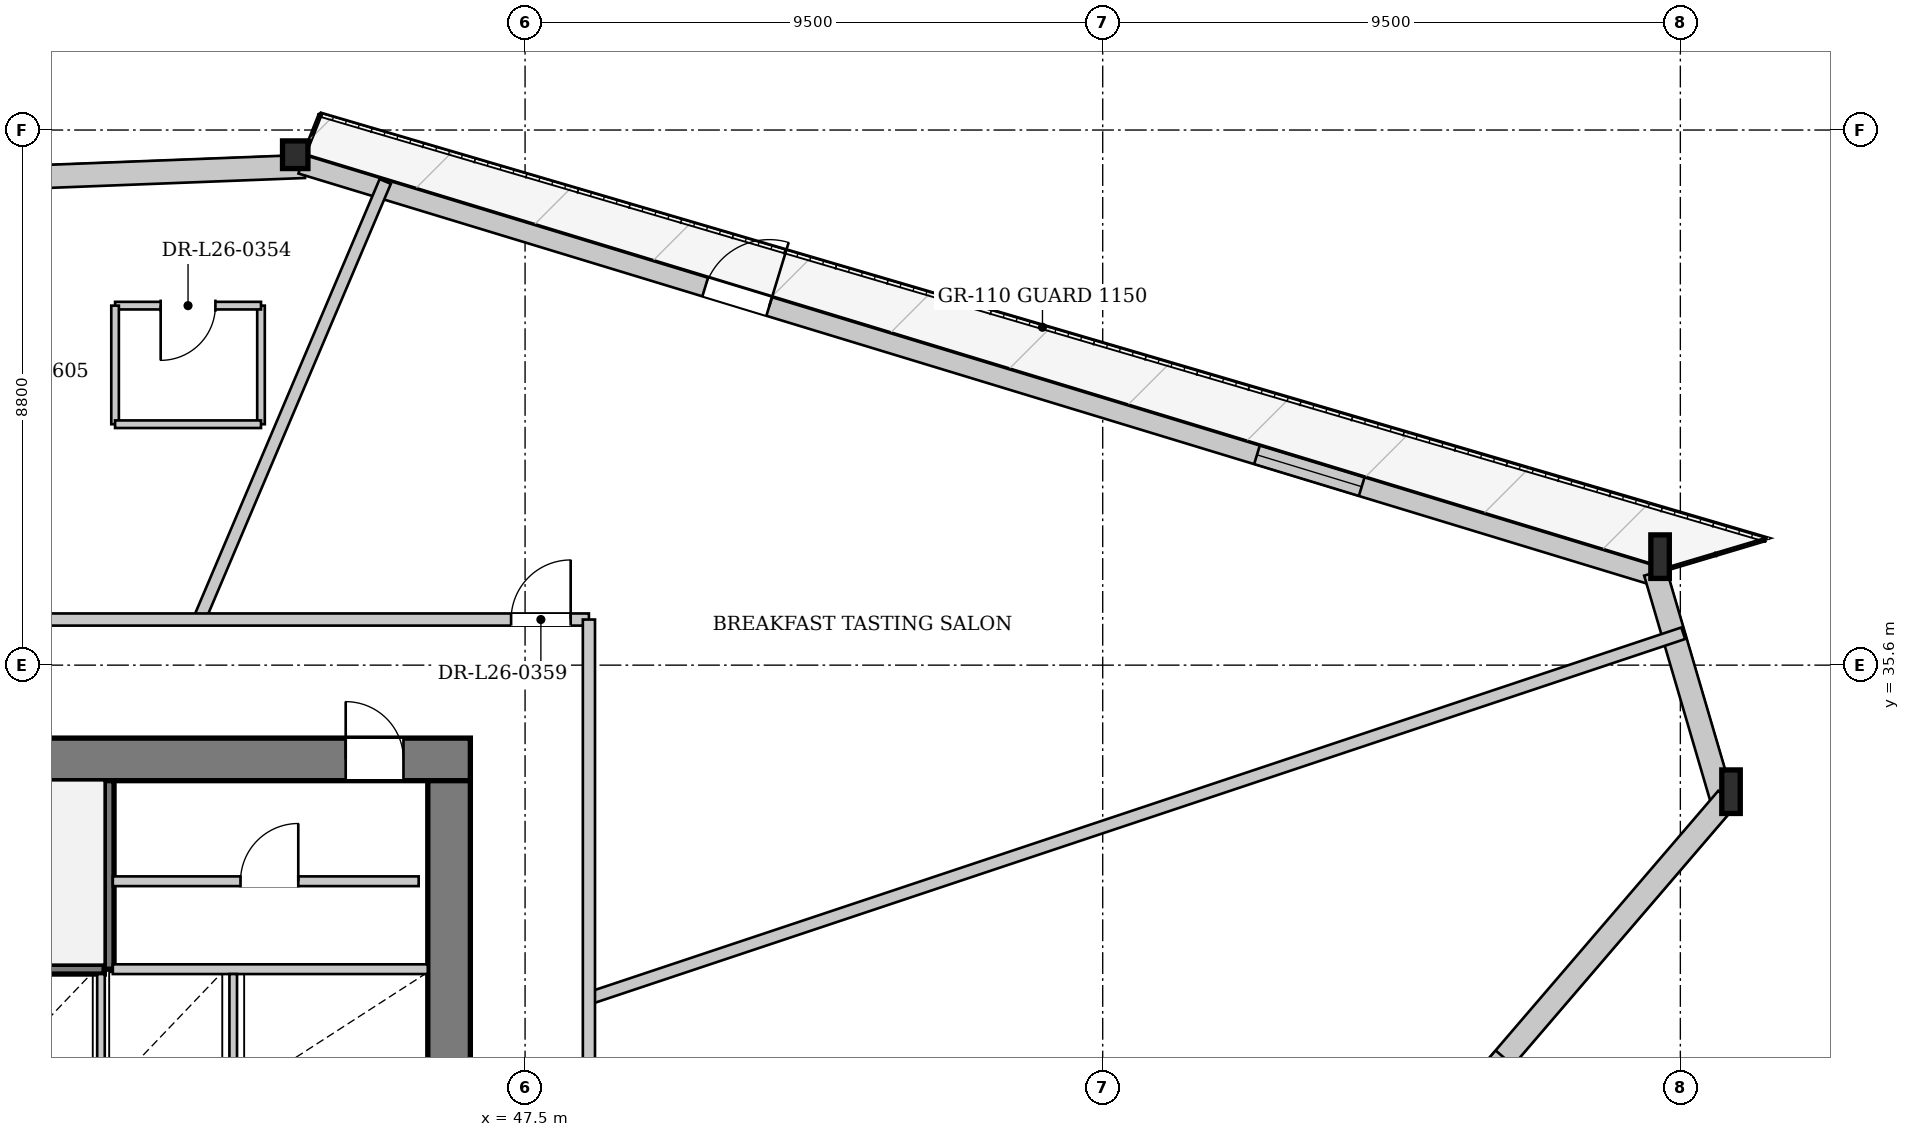
"""IFC4 building model, lengths in metres.
Left out: names, types, materials, properties, quantities, classifications, styles, units other than length and angle.
Written with IfcOpenShell. Run it as: python <this file> out.ifc"""

import sys

from ifc_helpers import new_model, si_unit, direction, frame, frame_2d, origin, origin_2d, place, context, subcontext, project, spatial, rectangle, i_section, extrude, source, transform, mapped, element, fill, save


model = new_model("IFC4")
c1 = context("Model", 3, precision=1e-05, world=origin(), true_north=direction((0.0, 1.0)))
c2 = subcontext(c1, "Body", "Model", "MODEL_VIEW")
j1 = project(units=[si_unit("LENGTHUNIT", "METRE"), si_unit("PLANEANGLEUNIT", "RADIAN")], contexts=[c1])
p1 = place(None, origin())
s1 = spatial("IfcSite", under=j1, at=p1, CompositionType="ELEMENT")
p2 = place(p1, origin())
s2 = spatial("IfcBuilding", under=s1, at=p2, CompositionType="ELEMENT")
p3 = place(p2, frame((0.0, 0.0, 102.15)))
s3 = spatial("IfcBuildingStorey", under=s2, at=p3, CompositionType="ELEMENT", Elevation=102.15)
m1 = source(origin(), c2, "Body", "SweptSolid", [
    extrude(i_section(OverallWidth=0.304, OverallDepth=0.716, WebThickness=0.021, FlangeThickness=0.04, at=origin_2d()), origin(), (0.0, 0.0, 1.0), 3.42),
])
p4 = place(p3, frame((67.412, 33.286, 0.0), z_axis=(-0.045751929855, 0.136185151582, 0.989626376671), x_axis=(-0.947935431433, -0.318462584669, 0.0)))
e1 = element("IfcColumn", 1, at=p4, inside=s3, PredefinedType="COLUMN", context=c2, shape_type="MappedRepresentation", body=[
    mapped(m1, transform((0.0, 0.0, 0.0), x_axis=(1.0, 0.0, 0.0), y_axis=(0.0, 1.0, 0.0), z_axis=(0.0, 0.0, 1.0), scale=1.0)),
])
m2 = source(origin(), c2, "Body", "SweptSolid", [
    extrude(i_section(OverallWidth=0.304, OverallDepth=0.716, WebThickness=0.021, FlangeThickness=0.04, at=origin_2d()), origin(), (0.0, 0.0, 1.0), 3.416),
])
p5 = place(p3, frame((66.27, 37.179, 0.0), z_axis=(-0.060390314415, 0.120280354036, 0.990901431202), x_axis=(-0.893682547282, -0.448699793496, 0.0)))
e2 = element("IfcColumn", 2, at=p5, inside=s3, PredefinedType="COLUMN", context=c2, shape_type="MappedRepresentation", body=[
    mapped(m2, transform((0.0, 0.0, 0.0), x_axis=(1.0, 0.0, 0.0), y_axis=(0.0, 1.0, 0.0), z_axis=(0.0, 0.0, 1.0), scale=1.0)),
])
m3 = source(origin(), c2, "Body", "SweptSolid", [
    extrude(i_section(OverallWidth=0.418, OverallDepth=0.455, WebThickness=0.038, FlangeThickness=0.059, at=origin_2d()), origin(), (0.0, 0.0, 1.0), 3.398),
])
p6 = place(p3, frame((43.866, 43.991, 0.0), z_axis=(-0.08615507832, 0.001652682904, 0.996280367727), x_axis=(-0.019179123824, -0.999816063688, 0.0)))
e3 = element("IfcColumn", 3, at=p6, inside=s3, PredefinedType="COLUMN", context=c2, shape_type="MappedRepresentation", body=[
    mapped(m3, transform((0.0, 0.0, 0.0), x_axis=(1.0, 0.0, 0.0), y_axis=(0.0, 1.0, 0.0), z_axis=(0.0, 0.0, 1.0), scale=1.0)),
])
p7 = place(p3, frame((20.475, 42.894, 0.0), z_axis=(0.0, 0.0, 1.0), x_axis=(0.999249191087, 0.038743439593, 0.0)))
e4 = element("IfcWall", 4, at=p7, inside=s3, PredefinedType="SOLIDWALL", context=c2, shape_type="SweptSolid", body=[
    extrude(rectangle(XDim=23.416, YDim=0.38, at=frame_2d((11.708, 0.0))), origin(), (0.0, 0.0, 1.0), 2.692),
])
p8 = place(p7, frame((5.457, 0.0, 0.322)))
e5 = element("IfcOpeningElement", 5, at=p8, cuts=e4, PredefinedType="OPENING", context=c2, shape_type="SweptSolid", body=[
    extrude(rectangle(XDim=2.2, YDim=2.25, at=frame_2d((1.1, 1.125))), frame((0.0, 0.2, 0.0), z_axis=(0.0, -1.0, 0.0), x_axis=(1.0, 0.0, 0.0)), (0.0, 0.0, 1.0), 0.4),
])
p9 = place(p7, frame((15.76, 0.0, 0.322)))
e6 = element("IfcOpeningElement", 6, at=p9, cuts=e4, PredefinedType="OPENING", context=c2, shape_type="SweptSolid", body=[
    extrude(rectangle(XDim=2.2, YDim=2.25, at=frame_2d((1.1, 1.125))), frame((0.0, 0.2, 0.0), z_axis=(0.0, -1.0, 0.0), x_axis=(1.0, 0.0, 0.0)), (0.0, 0.0, 1.0), 0.4),
])
p10 = place(p3, frame((43.82, 43.838, 0.0), z_axis=(0.0, 0.0, 1.0), x_axis=(0.956744940145, -0.290928031491, 0.0)))
e7 = element("IfcWall", 7, at=p10, inside=s3, PredefinedType="SOLIDWALL", context=c2, shape_type="SweptSolid", body=[
    extrude(rectangle(XDim=23.417, YDim=0.32, at=frame_2d((11.708, 0.0))), origin(), (0.0, 0.0, 1.0), 2.692),
])
p11 = place(p10, frame((6.943, 0.0, 0.0)))
e8 = element("IfcOpeningElement", 8, at=p11, cuts=e7, PredefinedType="OPENING", context=c2, shape_type="SweptSolid", body=[
    extrude(rectangle(XDim=1.1, YDim=2.3, at=frame_2d((0.55, 1.15))), frame((0.0, 0.17, 0.0), z_axis=(0.0, -1.0, 0.0), x_axis=(1.0, 0.0, 0.0)), (0.0, 0.0, 1.0), 0.34),
])
p12 = place(p10, frame((16.428, 0.0, 0.372)))
e9 = element("IfcOpeningElement", 9, at=p12, cuts=e7, PredefinedType="OPENING", context=c2, shape_type="SweptSolid", body=[
    extrude(rectangle(XDim=1.8, YDim=2.2, at=frame_2d((0.9, 1.1))), frame((0.0, 0.17, 0.0), z_axis=(0.0, -1.0, 0.0), x_axis=(1.0, 0.0, 0.0)), (0.0, 0.0, 1.0), 0.34),
])
p13 = place(p3, frame((66.087, 37.125, 0.0), z_axis=(0.0, 0.0, 1.0), x_axis=(0.281534153889, -0.959551207698, 0.0)))
e10 = element("IfcWall", 10, at=p13, inside=s3, PredefinedType="SOLIDWALL", context=c2, shape_type="SweptSolid", body=[
    extrude(rectangle(XDim=4.057, YDim=0.38, at=frame_2d((2.028, 0.0))), origin(), (0.0, 0.0, 1.0), 2.692),
])
p14 = place(p3, frame((67.268, 33.409, 0.0), z_axis=(0.0, 0.0, 1.0), x_axis=(-0.651112760172, -0.75898101, 0.0)))
e11 = element("IfcWall", 11, at=p14, inside=s3, PredefinedType="SOLIDWALL", context=c2, shape_type="SweptSolid", body=[
    extrude(rectangle(XDim=24.018, YDim=0.38, at=frame_2d((12.009, 0.0))), origin(), (0.0, 0.0, 1.0), 2.692),
])
p15 = place(p14, frame((5.625, 0.0, 0.322)))
e12 = element("IfcOpeningElement", 12, at=p15, cuts=e11, PredefinedType="OPENING", context=c2, shape_type="SweptSolid", body=[
    extrude(rectangle(XDim=2.2, YDim=2.25, at=frame_2d((1.1, 1.125))), frame((0.0, 0.2, 0.0), z_axis=(0.0, -1.0, 0.0), x_axis=(1.0, 0.0, 0.0)), (0.0, 0.0, 1.0), 0.4),
])
p16 = place(p14, frame((16.193, 0.0, 0.322)))
e13 = element("IfcOpeningElement", 13, at=p16, cuts=e11, PredefinedType="OPENING", context=c2, shape_type="SweptSolid", body=[
    extrude(rectangle(XDim=2.2, YDim=2.25, at=frame_2d((1.1, 1.125))), frame((0.0, 0.2, 0.0), z_axis=(0.0, -1.0, 0.0), x_axis=(1.0, 0.0, 0.0)), (0.0, 0.0, 1.0), 0.4),
])
p17 = place(p3, frame((29.4, 34.05, 0.0), z_axis=(0.0, 0.0, 1.0), x_axis=(1.0, 0.0, 0.0)))
e14 = element("IfcWall", 14, at=p17, inside=s3, PredefinedType="SHEAR", context=c2, shape_type="SweptSolid", body=[
    extrude(rectangle(XDim=17.2, YDim=0.7, at=frame_2d((8.6, 0.0))), origin(), (0.0, 0.0, 1.0), 3.3),
])
p18 = place(p17, frame((1.7, 0.0, 0.0)))
e15 = element("IfcOpeningElement", 15, at=p18, cuts=e14, PredefinedType="OPENING", context=c2, shape_type="SweptSolid", body=[
    extrude(rectangle(XDim=0.95, YDim=2.1, at=frame_2d((0.475, 1.05))), frame((0.0, 0.36, 0.0), z_axis=(0.0, -1.0, 0.0), x_axis=(1.0, 0.0, 0.0)), (0.0, 0.0, 1.0), 0.72),
])
p19 = place(p17, frame((4.08, 0.0, 0.0)))
e16 = element("IfcOpeningElement", 16, at=p19, cuts=e14, PredefinedType="OPENING", context=c2, shape_type="SweptSolid", body=[
    extrude(rectangle(XDim=1.32, YDim=2.2, at=frame_2d((0.66, 1.1))), frame((0.0, 0.36, 0.0), z_axis=(0.0, -1.0, 0.0), x_axis=(1.0, 0.0, 0.0)), (0.0, 0.0, 1.0), 0.72),
])
p20 = place(p17, frame((15.15, 0.0, 0.0)))
e17 = element("IfcOpeningElement", 17, at=p20, cuts=e14, PredefinedType="OPENING", context=c2, shape_type="SweptSolid", body=[
    extrude(rectangle(XDim=0.95, YDim=2.1, at=frame_2d((0.475, 1.05))), frame((0.0, 0.36, 0.0), z_axis=(0.0, -1.0, 0.0), x_axis=(1.0, 0.0, 0.0)), (0.0, 0.0, 1.0), 0.72),
])
p21 = place(p3, frame((46.25, 33.7, 0.0), z_axis=(0.0, 0.0, 1.0), x_axis=(0.0, -1.0, 0.0)))
e18 = element("IfcWall", 18, at=p21, inside=s3, PredefinedType="SHEAR", context=c2, shape_type="SweptSolid", body=[
    extrude(rectangle(XDim=14.2, YDim=0.7, at=frame_2d((7.1, 0.0))), origin(), (0.0, 0.0, 1.0), 3.3),
])
p22 = place(p21, frame((5.18, 0.0, 0.0)))
e19 = element("IfcOpeningElement", 19, at=p22, cuts=e18, PredefinedType="OPENING", context=c2, shape_type="SweptSolid", body=[
    extrude(rectangle(XDim=1.6, YDim=2.2, at=frame_2d((0.8, 1.1))), frame((0.0, 0.36, 0.0), z_axis=(0.0, -1.0, 0.0), x_axis=(1.0, 0.0, 0.0)), (0.0, 0.0, 1.0), 0.72),
])
p23 = place(p3, frame((33.28, 30.6, 0.0), z_axis=(0.0, 0.0, 1.0), x_axis=(1.0, 0.0, 0.0)))
e20 = element("IfcWall", 20, at=p23, inside=s3, PredefinedType="PARTITIONING", context=c2, shape_type="SweptSolid", body=[
    extrude(rectangle(XDim=7.3, YDim=0.16, at=frame_2d((3.65, 0.0))), origin(), (0.0, 0.0, 1.0), 3.3),
])
p24 = place(p3, frame((40.66, 30.6, 0.0), z_axis=(0.0, 0.0, 1.0), x_axis=(0.0, 1.0, 0.0)))
e21 = element("IfcWall", 21, at=p24, inside=s3, PredefinedType="PARTITIONING", context=c2, shape_type="SweptSolid", body=[
    extrude(rectangle(XDim=3.1, YDim=0.16, at=frame_2d((1.55, 0.0))), origin(), (0.0, 0.0, 1.0), 3.3),
])
p25 = place(p3, frame((40.72, 30.6, 0.0), z_axis=(0.0, 0.0, 1.0), x_axis=(1.0, 0.0, 0.0)))
e22 = element("IfcWall", 22, at=p25, inside=s3, PredefinedType="PARTITIONING", context=c2, shape_type="SweptSolid", body=[
    extrude(rectangle(XDim=5.18, YDim=0.16, at=frame_2d((2.59, 0.0))), origin(), (0.0, 0.0, 1.0), 3.3),
])
for number, where, z_axis, x_axis in (
    (23, (40.525, 28.6, 0.0), (0.0, 0.0, 1.0), (0.0, 1.0, 0.0)),
    (24, (42.7, 28.6, 0.0), (0.0, 0.0, 1.0), (0.0, 1.0, 0.0)),
):
    element("IfcWall", number, at=place(p3, frame(where, z_axis=z_axis, x_axis=x_axis)), inside=s3, PredefinedType="PARTITIONING", context=c2, shape_type="SweptSolid", body=[
        extrude(rectangle(XDim=1.92, YDim=0.125, at=frame_2d((0.96, 0.0))), origin(), (0.0, 0.0, 1.0), 3.3),
    ])
p26 = place(p3, frame((40.72, 32.046, 0.0), z_axis=(0.0, 0.0, 1.0), x_axis=(1.0, 0.0, 0.0)))
e25 = element("IfcWall", 25, at=p26, inside=s3, PredefinedType="PARTITIONING", context=c2, shape_type="SweptSolid", body=[
    extrude(rectangle(XDim=5.03, YDim=0.16, at=frame_2d((2.515, 0.0))), origin(), (0.0, 0.0, 1.0), 3.3),
])
p27 = place(p26, frame((2.1, 0.0, 0.0)))
e26 = element("IfcOpeningElement", 26, at=p27, cuts=e25, PredefinedType="OPENING", context=c2, shape_type="SweptSolid", body=[
    extrude(rectangle(XDim=0.95, YDim=2.1, at=frame_2d((0.475, 1.05))), frame((0.0, 0.09, 0.0), z_axis=(0.0, -1.0, 0.0), x_axis=(1.0, 0.0, 0.0)), (0.0, 0.0, 1.0), 0.18),
])
p28 = place(p3, frame((48.55, 30.12, 0.0), z_axis=(0.0, 0.0, 1.0), x_axis=(0.948597047754, 0.31648639938, 0.0)))
e27 = element("IfcWall", 27, at=p28, inside=s3, PredefinedType="PARTITIONING", context=c2, shape_type="SweptSolid", body=[
    extrude(rectangle(XDim=18.973, YDim=0.2, at=frame_2d((9.486, 0.0))), origin(), (0.0, 0.0, 1.0), 3.3),
])
p29 = place(p3, frame((42.141, 36.35, 0.0), z_axis=(0.0, 0.0, 1.0), x_axis=(0.390916709441, 0.920426056932, 0.0)))
e28 = element("IfcWall", 28, at=p29, inside=s3, PredefinedType="PARTITIONING", context=c2, shape_type="SweptSolid", body=[
    extrude(rectangle(XDim=7.827, YDim=0.2, at=frame_2d((3.913, 0.0))), origin(), (0.0, 0.0, 1.0), 3.3),
])
p30 = place(p3, frame((43.157, 39.562, 0.0), z_axis=(0.0, 0.0, 1.0), x_axis=(0.0, 1.0, 0.0)))
e29 = element("IfcWall", 29, at=p30, inside=s3, PredefinedType="PARTITIONING", context=c2, shape_type="SweptSolid", body=[
    extrude(rectangle(XDim=1.95, YDim=0.125, at=frame_2d((0.975, 0.0))), origin(), (0.0, 0.0, 1.0), 3.3),
])
p31 = place(p3, frame((43.157, 41.512, 0.0), z_axis=(0.0, 0.0, 1.0), x_axis=(-1.0, 0.0, 0.0)))
e30 = element("IfcWall", 30, at=p31, inside=s3, PredefinedType="PARTITIONING", context=c2, shape_type="SweptSolid", body=[
    extrude(rectangle(XDim=2.4, YDim=0.125, at=frame_2d((1.2, 0.0))), origin(), (0.0, 0.0, 1.0), 3.3),
])
p32 = place(p31, frame((0.75, 0.0, 0.0)))
e31 = element("IfcOpeningElement", 31, at=p32, cuts=e30, PredefinedType="OPENING", context=c2, shape_type="SweptSolid", body=[
    extrude(rectangle(XDim=0.9, YDim=2.1, at=frame_2d((0.45, 1.05))), frame((0.0, 0.073, 0.0), z_axis=(0.0, -1.0, 0.0), x_axis=(1.0, 0.0, 0.0)), (0.0, 0.0, 1.0), 0.145),
])
p33 = place(p3, frame((40.757, 41.512, 0.0), z_axis=(0.0, 0.0, 1.0), x_axis=(0.0, -1.0, 0.0)))
e32 = element("IfcWall", 32, at=p33, inside=s3, PredefinedType="PARTITIONING", context=c2, shape_type="SweptSolid", body=[
    extrude(rectangle(XDim=1.95, YDim=0.125, at=frame_2d((0.975, 0.0))), origin(), (0.0, 0.0, 1.0), 3.3),
])
p34 = place(p3, frame((40.757, 39.562, 0.0), z_axis=(0.0, 0.0, 1.0), x_axis=(1.0, 0.0, 0.0)))
e33 = element("IfcWall", 33, at=p34, inside=s3, PredefinedType="PARTITIONING", context=c2, shape_type="SweptSolid", body=[
    extrude(rectangle(XDim=2.4, YDim=0.125, at=frame_2d((1.2, 0.0))), origin(), (0.0, 0.0, 1.0), 3.045),
])
p35 = place(p3, frame((27.45, 36.35, 0.0), z_axis=(0.0, 0.0, 1.0), x_axis=(1.0, 0.0, 0.0)))
e34 = element("IfcWall", 34, at=p35, inside=s3, PredefinedType="PARTITIONING", context=c2, shape_type="SweptSolid", body=[
    extrude(rectangle(XDim=21.1, YDim=0.2, at=frame_2d((10.55, 0.0))), origin(), (0.0, 0.0, 1.0), 3.3),
])
p36 = place(p35, frame((19.82, 0.0, 0.0)))
e35 = element("IfcOpeningElement", 35, at=p36, cuts=e34, PredefinedType="OPENING", context=c2, shape_type="SweptSolid", body=[
    extrude(rectangle(XDim=0.98, YDim=2.15, at=frame_2d((0.49, 1.075))), frame((0.0, 0.11, 0.0), z_axis=(0.0, -1.0, 0.0), x_axis=(1.0, 0.0, 0.0)), (0.0, 0.0, 1.0), 0.22),
])
p37 = place(p35, frame((8.513, 0.0, 0.0)))
e36 = element("IfcOpeningElement", 36, at=p37, cuts=e34, PredefinedType="OPENING", context=c2, shape_type="SweptSolid", body=[
    extrude(rectangle(XDim=0.98, YDim=2.15, at=frame_2d((0.49, 1.075))), frame((0.0, 0.11, 0.0), z_axis=(0.0, -1.0, 0.0), x_axis=(1.0, 0.0, 0.0)), (0.0, 0.0, 1.0), 0.22),
])
p38 = place(p3, frame((48.55, 16.85, 0.0), z_axis=(0.0, 0.0, 1.0), x_axis=(0.0, 1.0, 0.0)))
e37 = element("IfcWall", 37, at=p38, inside=s3, PredefinedType="PARTITIONING", context=c2, shape_type="SweptSolid", body=[
    extrude(rectangle(XDim=19.5, YDim=0.2, at=frame_2d((9.75, 0.0))), origin(), (0.0, 0.0, 1.0), 3.3),
])
p39 = place(p38, frame((7.951, 0.0, 0.0)))
e38 = element("IfcOpeningElement", 38, at=p39, cuts=e37, PredefinedType="OPENING", context=c2, shape_type="SweptSolid", body=[
    extrude(rectangle(XDim=0.98, YDim=2.15, at=frame_2d((0.49, 1.075))), frame((0.0, 0.11, 0.0), z_axis=(0.0, -1.0, 0.0), x_axis=(1.0, 0.0, 0.0)), (0.0, 0.0, 1.0), 0.22),
])
m4 = source(origin(), c2, "Body", "SweptSolid", [
    extrude(rectangle(XDim=1.1, YDim=2.3, at=frame_2d((0.55, 1.15))), frame((0.0, 0.025, 0.0), z_axis=(0.0, -1.0, 0.0), x_axis=(1.0, 0.0, 0.0)), (0.0, 0.0, 1.0), 0.05),
])
p40 = place(p11, origin())
e39 = element("IfcDoor", 39, at=p40, inside=s3, OperationType="SINGLE_SWING_RIGHT", PredefinedType="DOOR", context=c2, shape_type="MappedRepresentation", body=[
    mapped(m4, transform((0.0, 0.0, 0.0), x_axis=(1.0, 0.0, 0.0), y_axis=(0.0, 1.0, 0.0), z_axis=(0.0, 0.0, 1.0), scale=1.0)),
])
fill(e8, e39)
m5 = source(origin(), c2, "Body", "SweptSolid", [
    extrude(rectangle(XDim=1.8, YDim=2.2, at=frame_2d((0.9, 1.1))), frame((0.0, 0.03, 0.0), z_axis=(0.0, -1.0, 0.0), x_axis=(1.0, 0.0, 0.0)), (0.0, 0.0, 1.0), 0.06),
])
p41 = place(p12, origin())
e40 = element("IfcWindow", 40, at=p41, inside=s3, PartitioningType="SINGLE_PANEL", PredefinedType="WINDOW", context=c2, shape_type="MappedRepresentation", body=[
    mapped(m5, transform((0.0, 0.0, 0.0), x_axis=(1.0, 0.0, 0.0), y_axis=(0.0, 1.0, 0.0), z_axis=(0.0, 0.0, 1.0), scale=1.0)),
])
fill(e9, e40)
m6 = source(origin(), c2, "Body", "SweptSolid", [
    extrude(rectangle(XDim=2.2, YDim=2.25, at=frame_2d((1.1, 1.125))), frame((0.0, 0.03, 0.0), z_axis=(0.0, -1.0, 0.0), x_axis=(1.0, 0.0, 0.0)), (0.0, 0.0, 1.0), 0.06),
])
p42 = place(p15, origin())
e41 = element("IfcWindow", 41, at=p42, inside=s3, PartitioningType="SINGLE_PANEL", PredefinedType="WINDOW", context=c2, shape_type="MappedRepresentation", body=[
    mapped(m6, transform((0.0, 0.0, 0.0), x_axis=(1.0, 0.0, 0.0), y_axis=(0.0, 1.0, 0.0), z_axis=(0.0, 0.0, 1.0), scale=1.0)),
])
fill(e12, e41)
m7 = source(origin(), c2, "Body", "SweptSolid", [
    extrude(rectangle(XDim=0.95, YDim=2.1, at=frame_2d((0.475, 1.05))), frame((0.0, 0.025, 0.0), z_axis=(0.0, -1.0, 0.0), x_axis=(1.0, 0.0, 0.0)), (0.0, 0.0, 1.0), 0.05),
])
p43 = place(p27, origin())
e42 = element("IfcDoor", 42, at=p43, inside=s3, OperationType="SINGLE_SWING_RIGHT", PredefinedType="DOOR", context=c2, shape_type="MappedRepresentation", body=[
    mapped(m7, transform((0.0, 0.0, 0.0), x_axis=(1.0, 0.0, 0.0), y_axis=(0.0, 1.0, 0.0), z_axis=(0.0, 0.0, 1.0), scale=1.0)),
])
fill(e26, e42)
p44 = place(p20, origin())
e43 = element("IfcDoor", 43, at=p44, inside=s3, OperationType="SINGLE_SWING_LEFT", PredefinedType="DOOR", context=c2, shape_type="MappedRepresentation", body=[
    mapped(m7, transform((0.0, 0.0, 0.0), x_axis=(1.0, 0.0, 0.0), y_axis=(0.0, 1.0, 0.0), z_axis=(0.0, 0.0, 1.0), scale=1.0)),
])
fill(e17, e43)
m8 = source(origin(), c2, "Body", "SweptSolid", [
    extrude(rectangle(XDim=0.9, YDim=2.1, at=frame_2d((0.45, 1.05))), frame((0.0, 0.025, 0.0), z_axis=(0.0, -1.0, 0.0), x_axis=(1.0, 0.0, 0.0)), (0.0, 0.0, 1.0), 0.05),
])
p45 = place(p32, origin())
e44 = element("IfcDoor", 44, at=p45, inside=s3, OperationType="SINGLE_SWING_RIGHT", PredefinedType="DOOR", context=c2, shape_type="MappedRepresentation", body=[
    mapped(m8, transform((0.0, 0.0, 0.0), x_axis=(1.0, 0.0, 0.0), y_axis=(0.0, 1.0, 0.0), z_axis=(0.0, 0.0, 1.0), scale=1.0)),
])
fill(e31, e44)
m9 = source(origin(), c2, "Body", "SweptSolid", [
    extrude(rectangle(XDim=0.98, YDim=2.15, at=frame_2d((0.49, 1.075))), frame((0.0, 0.025, 0.0), z_axis=(0.0, -1.0, 0.0), x_axis=(1.0, 0.0, 0.0)), (0.0, 0.0, 1.0), 0.05),
])
p46 = place(p36, origin())
e45 = element("IfcDoor", 45, at=p46, inside=s3, OperationType="SINGLE_SWING_RIGHT", PredefinedType="DOOR", context=c2, shape_type="MappedRepresentation", body=[
    mapped(m9, transform((0.0, 0.0, 0.0), x_axis=(1.0, 0.0, 0.0), y_axis=(0.0, 1.0, 0.0), z_axis=(0.0, 0.0, 1.0), scale=1.0)),
])
fill(e35, e45)
save(model, sys.argv[1])
